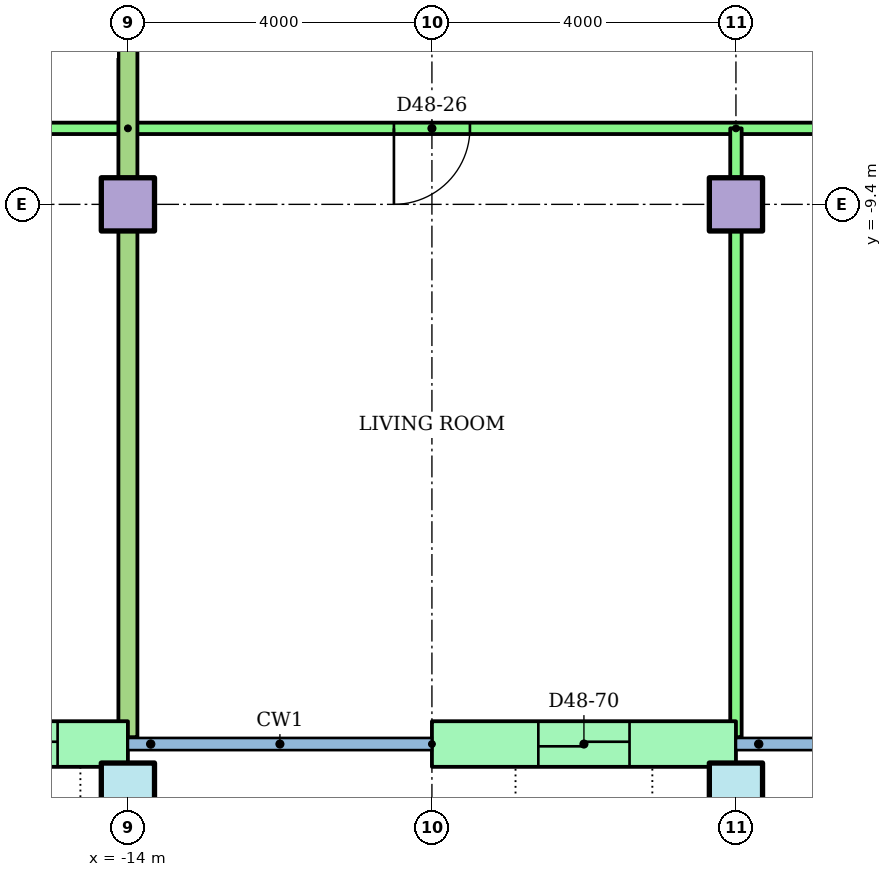
"""IFC4 building model, lengths in metres.
Left out: names, types, materials, properties, quantities, classifications, styles, units other than length and angle.
Written with IfcOpenShell. Run it as: python <this file> out.ifc"""

import sys

from ifc_helpers import new_model, si_unit, direction, frame, frame_2d, origin, origin_2d, place, context, subcontext, project, spatial, rectangle, hollow_rectangle, extrude, element, fill, save


model = new_model("IFC4")
c1 = context("Model", 3, precision=1e-05, world=origin(), true_north=direction((0.0, 1.0)))
c2 = subcontext(c1, "Body", "Model", "MODEL_VIEW")
j1 = project(units=[si_unit("LENGTHUNIT", "METRE"), si_unit("PLANEANGLEUNIT", "RADIAN")], contexts=[c1])
p1 = place(None, origin())
s1 = spatial("IfcSite", under=j1, at=p1, CompositionType="ELEMENT")
p2 = place(p1, origin())
s2 = spatial("IfcBuilding", under=s1, at=p2, CompositionType="ELEMENT")
p3 = place(p2, frame((0.0, 0.0, 184.5)))
s3 = spatial("IfcBuildingStorey", under=s2, at=p3, CompositionType="ELEMENT", Elevation=184.5)
for number, where in (
    (1, (-14.0, -17.1, 0.0)),
    (2, (-6.0, -17.1, 0.0)),
):
    element("IfcColumn", number, at=place(p3, frame(where)), inside=s3, PredefinedType="COLUMN", context=c2, shape_type="SweptSolid", body=[
        extrude(hollow_rectangle(XDim=0.7, YDim=0.7, WallThickness=0.036, at=origin_2d()), origin(), (0.0, 0.0, 1.0), 3.2),
    ])
for number, where in (
    (3, (-14.0, -9.4, 0.0)),
    (4, (-6.0, -9.4, 0.0)),
):
    element("IfcColumn", number, at=place(p3, frame(where)), inside=s3, PredefinedType="COLUMN", context=c2, shape_type="SweptSolid", body=[
        extrude(rectangle(XDim=0.7, YDim=0.7, at=origin_2d()), origin(), (0.0, 0.0, 1.0), 3.2),
    ])
p4 = place(p3, frame((-17.05, -16.5, 0.0)))
e5 = element("IfcWall", 5, at=p4, inside=s3, PredefinedType="STANDARD", context=c2, shape_type="SweptSolid", body=[
    extrude(rectangle(XDim=3.05, YDim=0.6, at=frame_2d((1.525, 0.0))), origin(), (0.0, 0.0, 1.0), 2.92),
])
p5 = place(p4, frame((0.925, 0.0, 0.0)))
e6 = element("IfcOpeningElement", 6, at=p5, cuts=e5, PredefinedType="OPENING", context=c2, shape_type="SweptSolid", body=[
    extrude(rectangle(XDim=1.2, YDim=2.1, at=frame_2d((0.6, 1.05))), frame((0.0, 0.31, 0.0), z_axis=(0.0, -1.0, 0.0), x_axis=(1.0, 0.0, 0.0)), (0.0, 0.0, 1.0), 0.62),
])
p6 = place(p3, frame((-10.0, -16.5, 0.0)))
e7 = element("IfcWall", 7, at=p6, inside=s3, PredefinedType="STANDARD", context=c2, shape_type="SweptSolid", body=[
    extrude(rectangle(XDim=4.0, YDim=0.6, at=frame_2d((2.0, 0.0))), origin(), (0.0, 0.0, 1.0), 2.92),
])
p7 = place(p6, frame((1.4, 0.0, 0.0)))
e8 = element("IfcOpeningElement", 8, at=p7, cuts=e7, PredefinedType="OPENING", context=c2, shape_type="SweptSolid", body=[
    extrude(rectangle(XDim=1.2, YDim=2.1, at=frame_2d((0.6, 1.05))), frame((0.0, 0.31, 0.0), z_axis=(0.0, -1.0, 0.0), x_axis=(1.0, 0.0, 0.0)), (0.0, 0.0, 1.0), 0.62),
])
p8 = place(p3, frame((-14.0, -8.4, 0.0), z_axis=(0.0, 0.0, 1.0), x_axis=(-1.0, 0.0, 0.0)))
e9 = element("IfcWall", 9, at=p8, inside=s3, PredefinedType="PARTITIONING", context=c2, shape_type="SweptSolid", body=[
    extrude(rectangle(XDim=10.81, YDim=0.15, at=frame_2d((5.405, 0.0))), origin(), (0.0, 0.0, 1.0), 2.4),
])
p9 = place(p8, frame((8.547, 0.0, 0.0)))
e10 = element("IfcOpeningElement", 10, at=p9, cuts=e9, PredefinedType="OPENING", context=c2, shape_type="SweptSolid", body=[
    extrude(rectangle(XDim=1.0, YDim=2.1, at=frame_2d((0.5, 1.05))), frame((0.0, 0.085, 0.0), z_axis=(0.0, -1.0, 0.0), x_axis=(1.0, 0.0, 0.0)), (0.0, 0.0, 1.0), 0.17),
])
p10 = place(p8, frame((2.55, 0.0, 0.0)))
e11 = element("IfcOpeningElement", 11, at=p10, cuts=e9, PredefinedType="OPENING", context=c2, shape_type="SweptSolid", body=[
    extrude(rectangle(XDim=1.0, YDim=2.1, at=frame_2d((0.5, 1.05))), frame((0.0, 0.085, 0.0), z_axis=(0.0, -1.0, 0.0), x_axis=(1.0, 0.0, 0.0)), (0.0, 0.0, 1.0), 0.17),
])
p11 = place(p3, frame((10.0, -8.4, 0.0), z_axis=(0.0, 0.0, 1.0), x_axis=(-1.0, 0.0, 0.0)))
e12 = element("IfcWall", 12, at=p11, inside=s3, PredefinedType="PARTITIONING", context=c2, shape_type="SweptSolid", body=[
    extrude(rectangle(XDim=24.0, YDim=0.15, at=frame_2d((12.0, 0.0))), origin(), (0.0, 0.0, 1.0), 2.4),
])
p12 = place(p11, frame((19.5, 0.0, 0.0)))
e13 = element("IfcOpeningElement", 13, at=p12, cuts=e12, PredefinedType="OPENING", context=c2, shape_type="SweptSolid", body=[
    extrude(rectangle(XDim=1.0, YDim=2.1, at=frame_2d((0.5, 1.05))), frame((0.0, 0.085, 0.0), z_axis=(0.0, -1.0, 0.0), x_axis=(1.0, 0.0, 0.0)), (0.0, 0.0, 1.0), 0.17),
])
p13 = place(p11, frame((13.55, 0.0, 0.0)))
e14 = element("IfcOpeningElement", 14, at=p13, cuts=e12, PredefinedType="OPENING", context=c2, shape_type="SweptSolid", body=[
    extrude(rectangle(XDim=0.9, YDim=2.1, at=frame_2d((0.45, 1.05))), frame((0.0, 0.085, 0.0), z_axis=(0.0, -1.0, 0.0), x_axis=(1.0, 0.0, 0.0)), (0.0, 0.0, 1.0), 0.17),
])
p14 = place(p11, frame((9.55, 0.0, 0.0)))
e15 = element("IfcOpeningElement", 15, at=p14, cuts=e12, PredefinedType="OPENING", context=c2, shape_type="SweptSolid", body=[
    extrude(rectangle(XDim=0.9, YDim=2.1, at=frame_2d((0.45, 1.05))), frame((0.0, 0.085, 0.0), z_axis=(0.0, -1.0, 0.0), x_axis=(1.0, 0.0, 0.0)), (0.0, 0.0, 1.0), 0.17),
])
p15 = place(p11, frame((5.55, 0.0, 0.0)))
e16 = element("IfcOpeningElement", 16, at=p15, cuts=e12, PredefinedType="OPENING", context=c2, shape_type="SweptSolid", body=[
    extrude(rectangle(XDim=0.9, YDim=2.1, at=frame_2d((0.45, 1.05))), frame((0.0, 0.085, 0.0), z_axis=(0.0, -1.0, 0.0), x_axis=(1.0, 0.0, 0.0)), (0.0, 0.0, 1.0), 0.17),
])
p16 = place(p11, frame((1.55, 0.0, 0.0)))
e17 = element("IfcOpeningElement", 17, at=p16, cuts=e12, PredefinedType="OPENING", context=c2, shape_type="SweptSolid", body=[
    extrude(rectangle(XDim=0.9, YDim=2.1, at=frame_2d((0.45, 1.05))), frame((0.0, 0.085, 0.0), z_axis=(0.0, -1.0, 0.0), x_axis=(1.0, 0.0, 0.0)), (0.0, 0.0, 1.0), 0.17),
])
p17 = place(p3, frame((-6.0, -8.4, 0.0), z_axis=(0.0, 0.0, 1.0), x_axis=(0.0, -1.0, 0.0)))
e18 = element("IfcWall", 18, at=p17, inside=s3, PredefinedType="PARTITIONING", context=c2, shape_type="SweptSolid", body=[
    extrude(rectangle(XDim=8.01, YDim=0.15, at=frame_2d((4.005, 0.0))), origin(), (0.0, 0.0, 1.0), 2.4),
])
p18 = place(p3, frame((-14.0, -1.4, 0.0), z_axis=(0.0, 0.0, 1.0), x_axis=(0.0, -1.0, 0.0)))
e19 = element("IfcWall", 19, at=p18, inside=s3, PredefinedType="PARTITIONING", context=c2, shape_type="SweptSolid", body=[
    extrude(rectangle(XDim=15.01, YDim=0.25, at=frame_2d((7.505, 0.0))), origin(), (0.0, 0.0, 1.0), 2.4),
])
p19 = place(p12, origin())
e20 = element("IfcDoor", 20, at=p19, inside=s3, OperationType="SINGLE_SWING_RIGHT", PredefinedType="DOOR", context=c2, shape_type="SweptSolid", body=[
    extrude(rectangle(XDim=1.0, YDim=2.1, at=frame_2d((0.5, 1.05))), frame((0.0, 0.025, 0.0), z_axis=(0.0, -1.0, 0.0), x_axis=(1.0, 0.0, 0.0)), (0.0, 0.0, 1.0), 0.05),
])
fill(e13, e20)
p20 = place(p5, origin())
e21 = element("IfcDoor", 21, at=p20, inside=s3, OperationType="SLIDING_TO_LEFT", PredefinedType="DOOR", context=c2, shape_type="SweptSolid", body=[
    extrude(rectangle(XDim=1.2, YDim=2.1, at=frame_2d((0.6, 1.05))), frame((0.0, 0.025, 0.0), z_axis=(0.0, -1.0, 0.0), x_axis=(1.0, 0.0, 0.0)), (0.0, 0.0, 1.0), 0.05),
])
fill(e6, e21)
p21 = place(p7, origin())
e22 = element("IfcDoor", 22, at=p21, inside=s3, OperationType="SLIDING_TO_LEFT", PredefinedType="DOOR", context=c2, shape_type="SweptSolid", body=[
    extrude(rectangle(XDim=1.2, YDim=2.1, at=frame_2d((0.6, 1.05))), frame((0.0, 0.025, 0.0), z_axis=(0.0, -1.0, 0.0), x_axis=(1.0, 0.0, 0.0)), (0.0, 0.0, 1.0), 0.05),
])
fill(e8, e22)
save(model, sys.argv[1])
